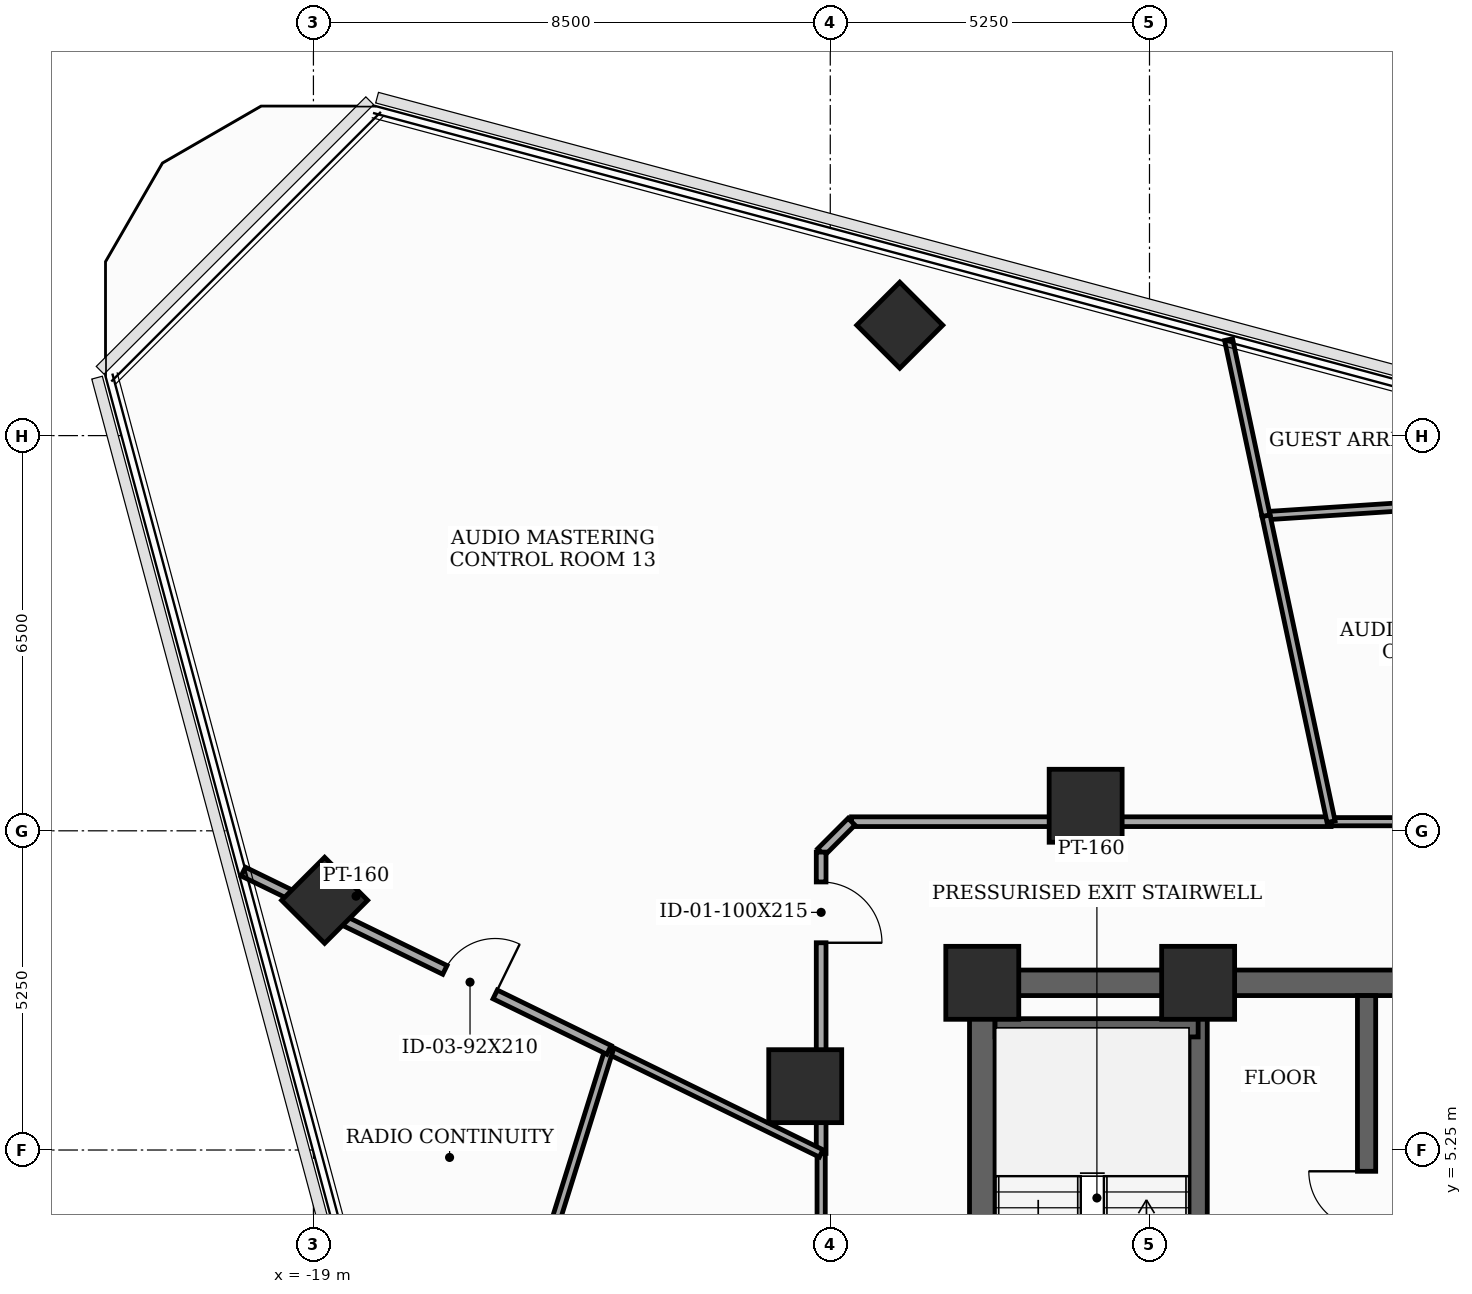
"""IFC4 building model, lengths in metres.
Left out: names, types, materials, properties, quantities, classifications, styles, units other than length and angle.
Written with IfcOpenShell. Run it as: python <this file> out.ifc"""

import sys

from ifc_helpers import new_model, si_unit, direction, frame, frame_2d, origin, origin_2d, place, context, subcontext, project, spatial, rectangle, extrude, element, fill, save


model = new_model("IFC4")
c1 = context("Model", 3, precision=1e-05, world=origin(), true_north=direction((0.0, 1.0)))
c2 = subcontext(c1, "Body", "Model", "MODEL_VIEW")
j1 = project(units=[si_unit("LENGTHUNIT", "METRE"), si_unit("PLANEANGLEUNIT", "RADIAN")], contexts=[c1])
p1 = place(None, origin())
s1 = spatial("IfcSite", under=j1, at=p1, CompositionType="ELEMENT")
p2 = place(p1, origin())
s2 = spatial("IfcBuilding", under=s1, at=p2, CompositionType="ELEMENT")
p3 = place(p2, frame((0.0, 0.0, 187.9)))
s3 = spatial("IfcBuildingStorey", under=s2, at=p3, CompositionType="ELEMENT", Elevation=187.9)
for number, where, z_axis, x_axis in (
    (1, (-4.45, 8.0, 0.0), (0.0, 0.0, 1.0), (1.0, 0.0, 0.0)),
    (2, (-8.0, 8.0, 0.0), (0.0, 0.0, 1.0), (1.0, 0.0, 0.0)),
    (3, (-6.3, 10.912, 0.0), (0.0, 0.0, 1.0), (1.0, 0.0, 0.0)),
    (4, (-10.912, 6.3, 0.0), (0.0, 0.0, 1.0), (1.0, 0.0, 0.0)),
):
    element("IfcColumn", number, at=place(p3, frame(where, z_axis=z_axis, x_axis=x_axis)), inside=s3, PredefinedType="COLUMN", context=c2, shape_type="SweptSolid", body=[
        extrude(rectangle(XDim=1.2, YDim=1.2, at=origin_2d()), origin(), (0.0, 0.0, 1.0), 3.7),
    ])
for number, where, z_axis, x_axis in (
    (5, (-9.357, 18.816, 0.0), (0.0, 0.0, 1.0), (0.707, 0.707, 0.0)),
    (6, (-18.816, 9.357, 0.0), (0.0, 0.0, 1.0), (0.707, 0.707, 0.0)),
):
    element("IfcColumn", number, at=place(p3, frame(where, z_axis=z_axis, x_axis=x_axis)), inside=s3, PredefinedType="COLUMN", context=c2, shape_type="SweptSolid", body=[
        extrude(rectangle(XDim=1.0, YDim=1.0, at=origin_2d()), origin(), (0.0, 0.0, 1.0), 3.7),
    ])
p4 = place(p3, frame((-8.0, -8.0, 0.0), z_axis=(0.0, 0.0, 1.0), x_axis=(0.0, 1.0, 0.0)))
e7 = element("IfcWall", 7, at=p4, inside=s3, PredefinedType="SHEAR", context=c2, shape_type="SweptSolid", body=[
    extrude(rectangle(XDim=16.0, YDim=0.42, at=frame_2d((8.0, 0.0))), origin(), (0.0, 0.0, 1.0), 3.5),
])
p5 = place(p4, frame((0.761, 0.0, 0.0)))
e8 = element("IfcOpeningElement", 8, at=p5, cuts=e7, PredefinedType="OPENING", context=c2, shape_type="SweptSolid", body=[
    extrude(rectangle(XDim=0.85, YDim=2.02, at=frame_2d((0.425, 1.01))), frame((0.0, 0.22, 0.0), z_axis=(0.0, -1.0, 0.0), x_axis=(1.0, 0.0, 0.0)), (0.0, 0.0, 1.0), 0.44),
])
p6 = place(p4, frame((5.35, 0.0, 0.0)))
e9 = element("IfcOpeningElement", 9, at=p6, cuts=e7, PredefinedType="OPENING", context=c2, shape_type="SweptSolid", body=[
    extrude(rectangle(XDim=1.05, YDim=2.15, at=frame_2d((0.525, 1.075))), frame((0.0, 0.22, 0.0), z_axis=(0.0, -1.0, 0.0), x_axis=(1.0, 0.0, 0.0)), (0.0, 0.0, 1.0), 0.44),
])
p7 = place(p3, frame((-8.0, 8.0, 0.0), z_axis=(0.0, 0.0, 1.0), x_axis=(1.0, 0.0, 0.0)))
e10 = element("IfcWall", 10, at=p7, inside=s3, PredefinedType="SHEAR", context=c2, shape_type="SweptSolid", body=[
    extrude(rectangle(XDim=16.0, YDim=0.42, at=frame_2d((8.0, 0.0))), origin(), (0.0, 0.0, 1.0), 3.5),
])
p8 = place(p7, frame((7.1, 0.0, 0.0)))
e11 = element("IfcOpeningElement", 11, at=p8, cuts=e10, PredefinedType="OPENING", context=c2, shape_type="SweptSolid", body=[
    extrude(rectangle(XDim=1.8, YDim=2.15, at=frame_2d((0.9, 1.075))), frame((0.0, 0.22, 0.0), z_axis=(0.0, -1.0, 0.0), x_axis=(1.0, 0.0, 0.0)), (0.0, 0.0, 1.0), 0.44),
])
p9 = place(p3, frame((-4.45, -7.79, 0.0), z_axis=(0.0, 0.0, 1.0), x_axis=(0.0, 1.0, 0.0)))
e12 = element("IfcWall", 12, at=p9, inside=s3, PredefinedType="SHEAR", context=c2, shape_type="SweptSolid", body=[
    extrude(rectangle(XDim=15.58, YDim=0.3, at=frame_2d((7.79, 0.0))), origin(), (0.0, 0.0, 1.0), 3.5),
])
p10 = place(p3, frame((-7.79, 7.26, 0.0), z_axis=(0.0, 0.0, 1.0), x_axis=(1.0, 0.0, 0.0)))
e13 = element("IfcWall", 13, at=p10, inside=s3, PredefinedType="SHEAR", context=c2, shape_type="SweptSolid", body=[
    extrude(rectangle(XDim=3.34, YDim=0.3, at=frame_2d((1.67, 0.0))), origin(), (0.0, 0.0, 1.0), 3.5),
])
p11 = place(p3, frame((-1.68, -4.85, 0.0), z_axis=(0.0, 0.0, 1.0), x_axis=(0.0, 1.0, 0.0)))
e14 = element("IfcWall", 14, at=p11, inside=s3, PredefinedType="SHEAR", context=c2, shape_type="SweptSolid", body=[
    extrude(rectangle(XDim=12.64, YDim=0.3, at=frame_2d((6.32, 0.0))), origin(), (0.0, 0.0, 1.0), 3.5),
])
p12 = place(p11, frame((2.6, 0.0, 0.0)))
e15 = element("IfcOpeningElement", 15, at=p12, cuts=e14, PredefinedType="OPENING", context=c2, shape_type="SweptSolid", body=[
    extrude(rectangle(XDim=0.95, YDim=2.1, at=frame_2d((0.475, 1.05))), frame((0.0, 0.16, 0.0), z_axis=(0.0, -1.0, 0.0), x_axis=(1.0, 0.0, 0.0)), (0.0, 0.0, 1.0), 0.32),
])
p13 = place(p11, frame((8.8, 0.0, 0.0)))
e16 = element("IfcOpeningElement", 16, at=p13, cuts=e14, PredefinedType="OPENING", context=c2, shape_type="SweptSolid", body=[
    extrude(rectangle(XDim=0.95, YDim=2.1, at=frame_2d((0.475, 1.05))), frame((0.0, 0.16, 0.0), z_axis=(0.0, -1.0, 0.0), x_axis=(1.0, 0.0, 0.0)), (0.0, 0.0, 1.0), 0.32),
])
p14 = place(p3, frame((-10.65, 5.194, 0.0), z_axis=(0.0, 0.0, 1.0), x_axis=(0.0, -1.0, 0.0)))
e17 = element("IfcWall", 17, at=p14, inside=s3, PredefinedType="PARTITIONING", context=c2, shape_type="SweptSolid", body=[
    extrude(rectangle(XDim=11.849, YDim=0.135, at=frame_2d((5.925, 0.0))), origin(), (0.0, 0.0, 1.0), 2.885),
])
p15 = place(p14, frame((6.871, 0.0, 0.0)))
e18 = element("IfcOpeningElement", 18, at=p15, cuts=e17, PredefinedType="OPENING", context=c2, shape_type="SweptSolid", body=[
    extrude(rectangle(XDim=0.95, YDim=2.1, at=frame_2d((0.475, 1.05))), frame((0.0, 0.077, 0.0), z_axis=(0.0, -1.0, 0.0), x_axis=(1.0, 0.0, 0.0)), (0.0, 0.0, 1.0), 0.155),
])
p16 = place(p3, frame((4.742, 10.65, 0.0), z_axis=(0.0, 0.0, 1.0), x_axis=(-1.0, 0.0, 0.0)))
e19 = element("IfcWall", 19, at=p16, inside=s3, PredefinedType="PARTITIONING", context=c2, shape_type="SweptSolid", body=[
    extrude(rectangle(XDim=7.006, YDim=0.135, at=frame_2d((3.503, 0.0))), origin(), (0.0, 0.0, 1.0), 2.885),
])
p17 = place(p16, frame((3.028, 0.0, 0.0)))
e20 = element("IfcOpeningElement", 20, at=p17, cuts=e19, PredefinedType="OPENING", context=c2, shape_type="SweptSolid", body=[
    extrude(rectangle(XDim=0.95, YDim=2.1, at=frame_2d((0.475, 1.05))), frame((0.0, 0.077, 0.0), z_axis=(0.0, -1.0, 0.0), x_axis=(1.0, 0.0, 0.0)), (0.0, 0.0, 1.0), 0.155),
])
p18 = place(p3, frame((-2.264, 10.65, 0.0), z_axis=(0.0, 0.0, 1.0), x_axis=(-1.0, 0.0, 0.0)))
e21 = element("IfcWall", 21, at=p18, inside=s3, PredefinedType="PARTITIONING", context=c2, shape_type="SweptSolid", body=[
    extrude(rectangle(XDim=7.886, YDim=0.16, at=frame_2d((3.943, 0.0))), origin(), (0.0, 0.0, 1.0), 2.885),
])
p19 = place(p3, frame((-10.15, 10.65, 0.0), z_axis=(0.0, 0.0, 1.0), x_axis=(-0.707106781187, -0.707106781187, 0.0)))
e22 = element("IfcWall", 22, at=p19, inside=s3, PredefinedType="PARTITIONING", context=c2, shape_type="SweptSolid", body=[
    extrude(rectangle(XDim=0.707, YDim=0.16, at=frame_2d((0.354, 0.0))), origin(), (0.0, 0.0, 1.0), 3.5),
])
p20 = place(p3, frame((-10.65, 10.15, 0.0), z_axis=(0.0, 0.0, 1.0), x_axis=(0.0, -1.0, 0.0)))
e23 = element("IfcWall", 23, at=p20, inside=s3, PredefinedType="PARTITIONING", context=c2, shape_type="SweptSolid", body=[
    extrude(rectangle(XDim=4.956, YDim=0.16, at=frame_2d((2.478, 0.0))), origin(), (0.0, 0.0, 1.0), 2.885),
])
p21 = place(p20, frame((0.491, 0.0, 0.0)))
e24 = element("IfcOpeningElement", 24, at=p21, cuts=e23, PredefinedType="OPENING", context=c2, shape_type="SweptSolid", body=[
    extrude(rectangle(XDim=1.0, YDim=2.15, at=frame_2d((0.5, 1.075))), frame((0.0, 0.09, 0.0), z_axis=(0.0, -1.0, 0.0), x_axis=(1.0, 0.0, 0.0)), (0.0, 0.0, 1.0), 0.18),
])
p22 = place(p3, frame((-10.65, 5.194, 0.0), z_axis=(0.0, 0.0, 1.0), x_axis=(-0.898773885441, 0.438412480261, 0.0)))
e25 = element("IfcWall", 25, at=p22, inside=s3, PredefinedType="PARTITIONING", context=c2, shape_type="SweptSolid", body=[
    extrude(rectangle(XDim=3.882, YDim=0.135, at=frame_2d((1.941, 0.0))), origin(), (0.0, 0.0, 1.0), 2.885),
])
p23 = place(p3, frame((-14.139, 6.896, 0.0), z_axis=(0.0, 0.0, 1.0), x_axis=(-0.298099863076, -0.954534688544, 0.0)))
e26 = element("IfcWall", 26, at=p23, inside=s3, PredefinedType="PARTITIONING", context=c2, shape_type="SweptSolid", body=[
    extrude(rectangle(XDim=5.16, YDim=0.135, at=frame_2d((2.58, 0.0))), origin(), (0.0, 0.0, 1.0), 3.5),
])
p24 = place(p3, frame((1.683, 16.012, 0.0), z_axis=(0.0, 0.0, 1.0), x_axis=(-0.997858663881, -0.065407086143, 0.0)))
e27 = element("IfcWall", 27, at=p24, inside=s3, PredefinedType="PARTITIONING", context=c2, shape_type="SweptSolid", body=[
    extrude(rectangle(XDim=5.028, YDim=0.135, at=frame_2d((2.514, 0.0))), origin(), (0.0, 0.0, 1.0), 2.975),
])
p25 = place(p3, frame((-3.334, 15.683, 0.0), z_axis=(0.0, 0.0, 1.0), x_axis=(0.207954085813, -0.978138588439, 0.0)))
e28 = element("IfcWall", 28, at=p25, inside=s3, PredefinedType="PARTITIONING", context=c2, shape_type="SweptSolid", body=[
    extrude(rectangle(XDim=5.146, YDim=0.135, at=frame_2d((2.573, 0.0))), origin(), (0.0, 0.0, 1.0), 2.885),
])
p26 = place(p3, frame((-3.949, 18.578, 0.0), z_axis=(0.0, 0.0, 1.0), x_axis=(0.207951490347, -0.978139140236, 0.0)))
e29 = element("IfcWall", 29, at=p26, inside=s3, PredefinedType="PARTITIONING", context=c2, shape_type="SweptSolid", body=[
    extrude(rectangle(XDim=2.96, YDim=0.135, at=frame_2d((1.48, 0.0))), origin(), (0.0, 0.0, 1.0), 2.975),
])
p27 = place(p3, frame((-20.154, 9.829, 0.0), z_axis=(0.0, 0.0, 1.0), x_axis=(0.898812268895, -0.43833378296, 0.0)))
e30 = element("IfcWall", 30, at=p27, inside=s3, PredefinedType="PARTITIONING", context=c2, shape_type="SweptSolid", body=[
    extrude(rectangle(XDim=6.692, YDim=0.16, at=frame_2d((3.346, 0.0))), origin(), (0.0, 0.0, 1.0), 2.985),
])
p28 = place(p27, frame((3.689, 0.0, 0.0)))
e31 = element("IfcOpeningElement", 31, at=p28, cuts=e30, PredefinedType="OPENING", context=c2, shape_type="SweptSolid", body=[
    extrude(rectangle(XDim=0.92, YDim=2.1, at=frame_2d((0.46, 1.05))), frame((0.0, 0.09, 0.0), z_axis=(0.0, -1.0, 0.0), x_axis=(1.0, 0.0, 0.0)), (0.0, 0.0, 1.0), 0.18),
])
p29 = place(p13, origin())
e32 = element("IfcDoor", 32, at=p29, inside=s3, OperationType="SINGLE_SWING_RIGHT", PredefinedType="DOOR", context=c2, shape_type="SweptSolid", body=[
    extrude(rectangle(XDim=0.95, YDim=2.1, at=frame_2d((0.475, 1.05))), frame((0.0, 0.025, 0.0), z_axis=(0.0, -1.0, 0.0), x_axis=(1.0, 0.0, 0.0)), (0.0, 0.0, 1.0), 0.05),
])
fill(e16, e32)
p30 = place(p21, origin())
e33 = element("IfcDoor", 33, at=p30, inside=s3, OperationType="SINGLE_SWING_RIGHT", PredefinedType="DOOR", context=c2, shape_type="SweptSolid", body=[
    extrude(rectangle(XDim=1.0, YDim=2.15, at=frame_2d((0.5, 1.075))), frame((0.0, 0.025, 0.0), z_axis=(0.0, -1.0, 0.0), x_axis=(1.0, 0.0, 0.0)), (0.0, 0.0, 1.0), 0.05),
])
fill(e24, e33)
p31 = place(p28, origin())
e34 = element("IfcDoor", 34, at=p31, inside=s3, OperationType="SINGLE_SWING_RIGHT", PredefinedType="DOOR", context=c2, shape_type="SweptSolid", body=[
    extrude(rectangle(XDim=0.92, YDim=2.1, at=frame_2d((0.46, 1.05))), frame((0.0, 0.025, 0.0), z_axis=(0.0, -1.0, 0.0), x_axis=(1.0, 0.0, 0.0)), (0.0, 0.0, 1.0), 0.05),
])
fill(e31, e34)
save(model, sys.argv[1])
